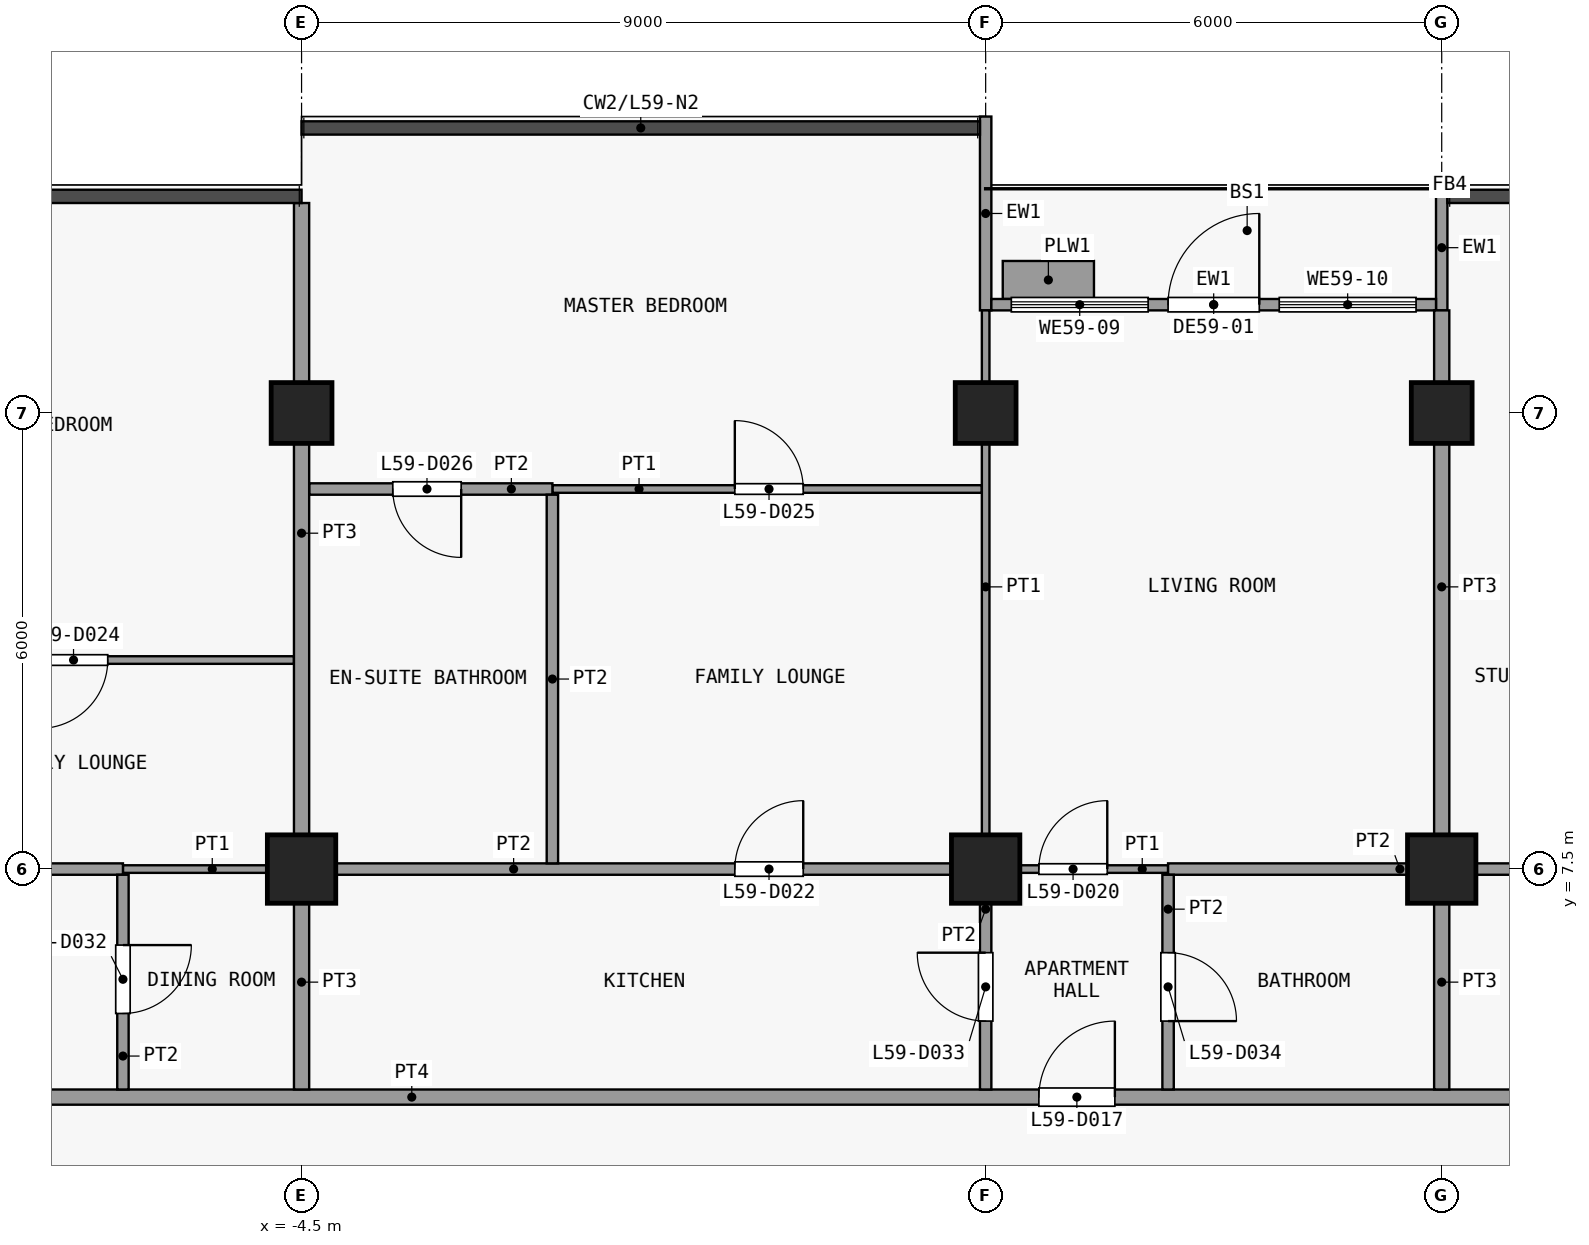
"""IFC4 building model, lengths in metres.
Left out: names, types, materials, properties, quantities, classifications, styles, units other than length and angle.
Written with IfcOpenShell. Run it as: python <this file> out.ifc"""

import sys

from ifc_helpers import new_model, si_unit, direction, frame, frame_2d, origin, origin_2d, place, context, subcontext, project, spatial, rectangle, extrude, element, fill, save


model = new_model("IFC4")
c1 = context("Model", 3, precision=1e-05, world=origin(), true_north=direction((0.0, 1.0)))
c2 = subcontext(c1, "Body", "Model", "MODEL_VIEW")
j1 = project(units=[si_unit("LENGTHUNIT", "METRE"), si_unit("PLANEANGLEUNIT", "RADIAN")], contexts=[c1])
p1 = place(None, origin())
s1 = spatial("IfcSite", under=j1, at=p1, CompositionType="ELEMENT")
p2 = place(p1, origin())
s2 = spatial("IfcBuilding", under=s1, at=p2, CompositionType="ELEMENT")
p3 = place(p2, frame((0.0, 0.0, 233.9)))
s3 = spatial("IfcBuildingStorey", under=s2, at=p3, CompositionType="ELEMENT", Elevation=233.9)
p4 = place(p3, frame((-4.5, 7.5, 0.0), z_axis=(0.0, 0.0, 1.0), x_axis=(1.0, 0.0, 0.0)))
e1 = element("IfcColumn", 1, at=p4, inside=s3, PredefinedType="COLUMN", context=c2, shape_type="SweptSolid", body=[
    extrude(rectangle(XDim=0.9, YDim=0.9, at=origin_2d()), origin(), (0.0, 0.0, 1.0), 3.6),
])
p5 = place(p3, frame((-4.5, 13.5, 0.0), z_axis=(0.0, 0.0, 1.0), x_axis=(1.0, 0.0, 0.0)))
e2 = element("IfcColumn", 2, at=p5, inside=s3, PredefinedType="COLUMN", context=c2, shape_type="SweptSolid", body=[
    extrude(rectangle(XDim=0.8, YDim=0.8, at=origin_2d()), origin(), (0.0, 0.0, 1.0), 3.6),
])
p6 = place(p3, frame((4.5, 7.5, 0.0), z_axis=(0.0, 0.0, 1.0), x_axis=(1.0, 0.0, 0.0)))
e3 = element("IfcColumn", 3, at=p6, inside=s3, PredefinedType="COLUMN", context=c2, shape_type="SweptSolid", body=[
    extrude(rectangle(XDim=0.9, YDim=0.9, at=origin_2d()), origin(), (0.0, 0.0, 1.0), 3.6),
])
p7 = place(p3, frame((4.5, 13.5, 0.0), z_axis=(0.0, 0.0, 1.0), x_axis=(1.0, 0.0, 0.0)))
e4 = element("IfcColumn", 4, at=p7, inside=s3, PredefinedType="COLUMN", context=c2, shape_type="SweptSolid", body=[
    extrude(rectangle(XDim=0.8, YDim=0.8, at=origin_2d()), origin(), (0.0, 0.0, 1.0), 3.6),
])
p8 = place(p3, frame((10.5, 7.5, 0.0), z_axis=(0.0, 0.0, 1.0), x_axis=(1.0, 0.0, 0.0)))
e5 = element("IfcColumn", 5, at=p8, inside=s3, PredefinedType="COLUMN", context=c2, shape_type="SweptSolid", body=[
    extrude(rectangle(XDim=0.9, YDim=0.9, at=origin_2d()), origin(), (0.0, 0.0, 1.0), 3.6),
])
p9 = place(p3, frame((10.5, 13.5, 0.0), z_axis=(0.0, 0.0, 1.0), x_axis=(1.0, 0.0, 0.0)))
e6 = element("IfcColumn", 6, at=p9, inside=s3, PredefinedType="COLUMN", context=c2, shape_type="SweptSolid", body=[
    extrude(rectangle(XDim=0.8, YDim=0.8, at=origin_2d()), origin(), (0.0, 0.0, 1.0), 3.6),
])
p10 = place(p3, frame((4.5, 14.85, 0.0), z_axis=(0.0, 0.0, 1.0), x_axis=(0.0, 1.0, 0.0)))
e7 = element("IfcWall", 7, at=p10, inside=s3, PredefinedType="SOLIDWALL", context=c2, shape_type="SweptSolid", body=[
    extrude(rectangle(XDim=2.55, YDim=0.15, at=frame_2d((1.275, 0.0))), origin(), (0.0, 0.0, 1.0), 3.3),
])
p11 = place(p3, frame((10.5, 14.85, 0.0), z_axis=(0.0, 0.0, 1.0), x_axis=(0.0, 1.0, 0.0)))
e8 = element("IfcWall", 8, at=p11, inside=s3, PredefinedType="SOLIDWALL", context=c2, shape_type="SweptSolid", body=[
    extrude(rectangle(XDim=1.65, YDim=0.15, at=frame_2d((0.825, 0.0))), origin(), (0.0, 0.0, 1.0), 3.3),
])
p12 = place(p3, frame((4.575, 14.925, 0.0), z_axis=(0.0, 0.0, 1.0), x_axis=(1.0, 0.0, 0.0)))
e9 = element("IfcWall", 9, at=p12, inside=s3, PredefinedType="SOLIDWALL", context=c2, shape_type="SweptSolid", body=[
    extrude(rectangle(XDim=5.85, YDim=0.15, at=frame_2d((2.925, 0.0))), origin(), (0.0, 0.0, 1.0), 3.3),
])
p13 = place(p12, frame((2.325, 0.0, 0.0)))
e10 = element("IfcOpeningElement", 10, at=p13, cuts=e9, PredefinedType="OPENING", context=c2, shape_type="SweptSolid", body=[
    extrude(rectangle(XDim=1.2, YDim=2.4, at=frame_2d((0.6, 1.2))), frame((0.0, 0.085, 0.0), z_axis=(0.0, -1.0, 0.0), x_axis=(1.0, 0.0, 0.0)), (0.0, 0.0, 1.0), 0.17),
])
p14 = place(p12, frame((0.262, 0.0, 0.9)))
e11 = element("IfcOpeningElement", 11, at=p14, cuts=e9, PredefinedType="OPENING", context=c2, shape_type="SweptSolid", body=[
    extrude(rectangle(XDim=1.8, YDim=2.1, at=frame_2d((0.9, 1.05))), frame((0.0, 0.085, 0.0), z_axis=(0.0, -1.0, 0.0), x_axis=(1.0, 0.0, 0.0)), (0.0, 0.0, 1.0), 0.17),
])
p15 = place(p12, frame((3.788, 0.0, 0.9)))
e12 = element("IfcOpeningElement", 12, at=p15, cuts=e9, PredefinedType="OPENING", context=c2, shape_type="SweptSolid", body=[
    extrude(rectangle(XDim=1.8, YDim=2.1, at=frame_2d((0.9, 1.05))), frame((0.0, 0.085, 0.0), z_axis=(0.0, -1.0, 0.0), x_axis=(1.0, 0.0, 0.0)), (0.0, 0.0, 1.0), 0.17),
])
p16 = place(p3, frame((4.725, 15.25, 0.0), z_axis=(0.0, 0.0, 1.0), x_axis=(1.0, 0.0, 0.0)))
e13 = element("IfcWall", 13, at=p16, inside=s3, PredefinedType="USERDEFINED", context=c2, shape_type="SweptSolid", body=[
    extrude(rectangle(XDim=1.2, YDim=0.5, at=frame_2d((0.6, 0.0))), origin(), (0.0, 0.0, 1.0), 0.9),
])
p17 = place(p3, frame((-20.25, 4.5, 0.0), z_axis=(0.0, 0.0, 1.0), x_axis=(1.0, 0.0, 0.0)))
e14 = element("IfcWall", 14, at=p17, inside=s3, PredefinedType="PARTITIONING", context=c2, shape_type="SweptSolid", body=[
    extrude(rectangle(XDim=39.6, YDim=0.2, at=frame_2d((19.8, 0.0))), origin(), (0.0, 0.0, 1.0), 3.3),
])
p18 = place(p17, frame((7.95, 0.0, 0.0)))
e15 = element("IfcOpeningElement", 15, at=p18, cuts=e14, PredefinedType="OPENING", context=c2, shape_type="SweptSolid", body=[
    extrude(rectangle(XDim=1.0, YDim=2.1, at=frame_2d((0.5, 1.05))), frame((0.0, 0.11, 0.0), z_axis=(0.0, -1.0, 0.0), x_axis=(1.0, 0.0, 0.0)), (0.0, 0.0, 1.0), 0.22),
])
p19 = place(p17, frame((25.45, 0.0, 0.0)))
e16 = element("IfcOpeningElement", 16, at=p19, cuts=e14, PredefinedType="OPENING", context=c2, shape_type="SweptSolid", body=[
    extrude(rectangle(XDim=1.0, YDim=2.1, at=frame_2d((0.5, 1.05))), frame((0.0, 0.11, 0.0), z_axis=(0.0, -1.0, 0.0), x_axis=(1.0, 0.0, 0.0)), (0.0, 0.0, 1.0), 0.22),
])
p20 = place(p17, frame((33.95, 0.0, 0.0)))
e17 = element("IfcOpeningElement", 17, at=p20, cuts=e14, PredefinedType="OPENING", context=c2, shape_type="SweptSolid", body=[
    extrude(rectangle(XDim=1.0, YDim=2.1, at=frame_2d((0.5, 1.05))), frame((0.0, 0.11, 0.0), z_axis=(0.0, -1.0, 0.0), x_axis=(1.0, 0.0, 0.0)), (0.0, 0.0, 1.0), 0.22),
])
p21 = place(p3, frame((-6.85, 7.5, 0.0), z_axis=(0.0, 0.0, 1.0), x_axis=(1.0, 0.0, 0.0)))
e18 = element("IfcWall", 18, at=p21, inside=s3, PredefinedType="PARTITIONING", context=c2, shape_type="SweptSolid", body=[
    extrude(rectangle(XDim=2.35, YDim=0.1, at=frame_2d((1.175, 0.0))), origin(), (0.0, 0.0, 1.0), 3.3),
])
p22 = place(p3, frame((4.5, 7.5, 0.0), z_axis=(0.0, 0.0, 1.0), x_axis=(1.0, 0.0, 0.0)))
e19 = element("IfcWall", 19, at=p22, inside=s3, PredefinedType="PARTITIONING", context=c2, shape_type="SweptSolid", body=[
    extrude(rectangle(XDim=2.4, YDim=0.1, at=frame_2d((1.2, 0.0))), origin(), (0.0, 0.0, 1.0), 3.3),
])
p23 = place(p22, frame((0.7, 0.0, 0.0)))
e20 = element("IfcOpeningElement", 20, at=p23, cuts=e19, PredefinedType="OPENING", context=c2, shape_type="SweptSolid", body=[
    extrude(rectangle(XDim=0.9, YDim=2.1, at=frame_2d((0.45, 1.05))), frame((0.0, 0.06, 0.0), z_axis=(0.0, -1.0, 0.0), x_axis=(1.0, 0.0, 0.0)), (0.0, 0.0, 1.0), 0.12),
])
p24 = place(p3, frame((-10.5, 7.5, 0.0), z_axis=(0.0, 0.0, 1.0), x_axis=(1.0, 0.0, 0.0)))
e21 = element("IfcWall", 21, at=p24, inside=s3, PredefinedType="PARTITIONING", context=c2, shape_type="SweptSolid", body=[
    extrude(rectangle(XDim=3.65, YDim=0.15, at=frame_2d((1.825, 0.0))), origin(), (0.0, 0.0, 1.0), 3.3),
])
p25 = place(p3, frame((-4.5, 7.5, 0.0), z_axis=(0.0, 0.0, 1.0), x_axis=(1.0, 0.0, 0.0)))
e22 = element("IfcWall", 22, at=p25, inside=s3, PredefinedType="PARTITIONING", context=c2, shape_type="SweptSolid", body=[
    extrude(rectangle(XDim=9.0, YDim=0.15, at=frame_2d((4.5, 0.0))), origin(), (0.0, 0.0, 1.0), 3.3),
])
p26 = place(p25, frame((5.7, 0.0, 0.0)))
e23 = element("IfcOpeningElement", 23, at=p26, cuts=e22, PredefinedType="OPENING", context=c2, shape_type="SweptSolid", body=[
    extrude(rectangle(XDim=0.9, YDim=2.1, at=frame_2d((0.45, 1.05))), frame((0.0, 0.085, 0.0), z_axis=(0.0, -1.0, 0.0), x_axis=(1.0, 0.0, 0.0)), (0.0, 0.0, 1.0), 0.17),
])
p27 = place(p3, frame((6.9, 7.5, 0.0), z_axis=(0.0, 0.0, 1.0), x_axis=(1.0, 0.0, 0.0)))
e24 = element("IfcWall", 24, at=p27, inside=s3, PredefinedType="PARTITIONING", context=c2, shape_type="SweptSolid", body=[
    extrude(rectangle(XDim=6.1, YDim=0.15, at=frame_2d((3.05, 0.0))), origin(), (0.0, 0.0, 1.0), 3.3),
])
p28 = place(p3, frame((-10.45, 10.25, 0.0), z_axis=(0.0, 0.0, 1.0), x_axis=(1.0, 0.0, 0.0)))
e25 = element("IfcWall", 25, at=p28, inside=s3, PredefinedType="PARTITIONING", context=c2, shape_type="SweptSolid", body=[
    extrude(rectangle(XDim=5.85, YDim=0.1, at=frame_2d((2.925, 0.0))), origin(), (0.0, 0.0, 1.0), 3.3),
])
p29 = place(p28, frame((2.5, 0.0, 0.0)))
e26 = element("IfcOpeningElement", 26, at=p29, cuts=e25, PredefinedType="OPENING", context=c2, shape_type="SweptSolid", body=[
    extrude(rectangle(XDim=0.9, YDim=2.1, at=frame_2d((0.45, 1.05))), frame((0.0, 0.06, 0.0), z_axis=(0.0, -1.0, 0.0), x_axis=(1.0, 0.0, 0.0)), (0.0, 0.0, 1.0), 0.12),
])
p30 = place(p3, frame((-1.2, 12.5, 0.0), z_axis=(0.0, 0.0, 1.0), x_axis=(1.0, 0.0, 0.0)))
e27 = element("IfcWall", 27, at=p30, inside=s3, PredefinedType="PARTITIONING", context=c2, shape_type="SweptSolid", body=[
    extrude(rectangle(XDim=5.65, YDim=0.1, at=frame_2d((2.825, 0.0))), origin(), (0.0, 0.0, 1.0), 3.3),
])
p31 = place(p30, frame((2.4, 0.0, 0.0)))
e28 = element("IfcOpeningElement", 28, at=p31, cuts=e27, PredefinedType="OPENING", context=c2, shape_type="SweptSolid", body=[
    extrude(rectangle(XDim=0.9, YDim=2.1, at=frame_2d((0.45, 1.05))), frame((0.0, 0.06, 0.0), z_axis=(0.0, -1.0, 0.0), x_axis=(1.0, 0.0, 0.0)), (0.0, 0.0, 1.0), 0.12),
])
p32 = place(p3, frame((-4.4, 12.5, 0.0), z_axis=(0.0, 0.0, 1.0), x_axis=(1.0, 0.0, 0.0)))
e29 = element("IfcWall", 29, at=p32, inside=s3, PredefinedType="PARTITIONING", context=c2, shape_type="SweptSolid", body=[
    extrude(rectangle(XDim=3.2, YDim=0.15, at=frame_2d((1.6, 0.0))), origin(), (0.0, 0.0, 1.0), 3.3),
])
p33 = place(p32, frame((1.1, 0.0, 0.0)))
e30 = element("IfcOpeningElement", 30, at=p33, cuts=e29, PredefinedType="OPENING", context=c2, shape_type="SweptSolid", body=[
    extrude(rectangle(XDim=0.9, YDim=2.1, at=frame_2d((0.45, 1.05))), frame((0.0, 0.085, 0.0), z_axis=(0.0, -1.0, 0.0), x_axis=(1.0, 0.0, 0.0)), (0.0, 0.0, 1.0), 0.17),
])
p34 = place(p3, frame((-6.85, 4.6, 0.0), z_axis=(0.0, 0.0, 1.0), x_axis=(0.0, 1.0, 0.0)))
e31 = element("IfcWall", 31, at=p34, inside=s3, PredefinedType="PARTITIONING", context=c2, shape_type="SweptSolid", body=[
    extrude(rectangle(XDim=2.825, YDim=0.15, at=frame_2d((1.413, 0.0))), origin(), (0.0, 0.0, 1.0), 3.3),
])
p35 = place(p34, frame((1.0, 0.0, 0.0)))
e32 = element("IfcOpeningElement", 32, at=p35, cuts=e31, PredefinedType="OPENING", context=c2, shape_type="SweptSolid", body=[
    extrude(rectangle(XDim=0.9, YDim=2.1, at=frame_2d((0.45, 1.05))), frame((0.0, 0.085, 0.0), z_axis=(0.0, -1.0, 0.0), x_axis=(1.0, 0.0, 0.0)), (0.0, 0.0, 1.0), 0.17),
])
p36 = place(p3, frame((-4.5, 4.6, 0.0), z_axis=(0.0, 0.0, 1.0), x_axis=(0.0, 1.0, 0.0)))
e33 = element("IfcWall", 33, at=p36, inside=s3, PredefinedType="PARTITIONING", context=c2, shape_type="SweptSolid", body=[
    extrude(rectangle(XDim=2.825, YDim=0.2, at=frame_2d((1.413, 0.0))), origin(), (0.0, 0.0, 1.0), 3.3),
])
p37 = place(p3, frame((-4.5, 7.575, 0.0), z_axis=(0.0, 0.0, 1.0), x_axis=(0.0, 1.0, 0.0)))
e34 = element("IfcWall", 34, at=p37, inside=s3, PredefinedType="PARTITIONING", context=c2, shape_type="SweptSolid", body=[
    extrude(rectangle(XDim=8.688, YDim=0.2, at=frame_2d((4.344, 0.0))), origin(), (0.0, 0.0, 1.0), 3.3),
])
p38 = place(p3, frame((-1.2, 7.575, 0.0), z_axis=(0.0, 0.0, 1.0), x_axis=(0.0, 1.0, 0.0)))
e35 = element("IfcWall", 35, at=p38, inside=s3, PredefinedType="PARTITIONING", context=c2, shape_type="SweptSolid", body=[
    extrude(rectangle(XDim=4.85, YDim=0.15, at=frame_2d((2.425, 0.0))), origin(), (0.0, 0.0, 1.0), 3.3),
])
p39 = place(p3, frame((4.5, 7.575, 0.0), z_axis=(0.0, 0.0, 1.0), x_axis=(0.0, 1.0, 0.0)))
e36 = element("IfcWall", 36, at=p39, inside=s3, PredefinedType="PARTITIONING", context=c2, shape_type="SweptSolid", body=[
    extrude(rectangle(XDim=7.275, YDim=0.1, at=frame_2d((3.638, 0.0))), origin(), (0.0, 0.0, 1.0), 3.3),
])
p40 = place(p3, frame((4.5, 4.6, 0.0), z_axis=(0.0, 0.0, 1.0), x_axis=(0.0, 1.0, 0.0)))
e37 = element("IfcWall", 37, at=p40, inside=s3, PredefinedType="PARTITIONING", context=c2, shape_type="SweptSolid", body=[
    extrude(rectangle(XDim=2.825, YDim=0.15, at=frame_2d((1.413, 0.0))), origin(), (0.0, 0.0, 1.0), 3.3),
])
p41 = place(p40, frame((0.9, 0.0, 0.0)))
e38 = element("IfcOpeningElement", 38, at=p41, cuts=e37, PredefinedType="OPENING", context=c2, shape_type="SweptSolid", body=[
    extrude(rectangle(XDim=0.9, YDim=2.1, at=frame_2d((0.45, 1.05))), frame((0.0, 0.085, 0.0), z_axis=(0.0, -1.0, 0.0), x_axis=(1.0, 0.0, 0.0)), (0.0, 0.0, 1.0), 0.17),
])
p42 = place(p3, frame((6.9, 4.6, 0.0), z_axis=(0.0, 0.0, 1.0), x_axis=(0.0, 1.0, 0.0)))
e39 = element("IfcWall", 39, at=p42, inside=s3, PredefinedType="PARTITIONING", context=c2, shape_type="SweptSolid", body=[
    extrude(rectangle(XDim=2.825, YDim=0.15, at=frame_2d((1.413, 0.0))), origin(), (0.0, 0.0, 1.0), 3.3),
])
p43 = place(p42, frame((0.9, 0.0, 0.0)))
e40 = element("IfcOpeningElement", 40, at=p43, cuts=e39, PredefinedType="OPENING", context=c2, shape_type="SweptSolid", body=[
    extrude(rectangle(XDim=0.9, YDim=2.1, at=frame_2d((0.45, 1.05))), frame((0.0, 0.085, 0.0), z_axis=(0.0, -1.0, 0.0), x_axis=(1.0, 0.0, 0.0)), (0.0, 0.0, 1.0), 0.17),
])
p44 = place(p3, frame((10.5, 4.6, 0.0), z_axis=(0.0, 0.0, 1.0), x_axis=(0.0, 1.0, 0.0)))
e41 = element("IfcWall", 41, at=p44, inside=s3, PredefinedType="PARTITIONING", context=c2, shape_type="SweptSolid", body=[
    extrude(rectangle(XDim=2.825, YDim=0.2, at=frame_2d((1.413, 0.0))), origin(), (0.0, 0.0, 1.0), 3.3),
])
p45 = place(p3, frame((10.5, 7.575, 0.0), z_axis=(0.0, 0.0, 1.0), x_axis=(0.0, 1.0, 0.0)))
e42 = element("IfcWall", 42, at=p45, inside=s3, PredefinedType="PARTITIONING", context=c2, shape_type="SweptSolid", body=[
    extrude(rectangle(XDim=7.275, YDim=0.2, at=frame_2d((3.638, 0.0))), origin(), (0.0, 0.0, 1.0), 3.3),
])
p46 = place(p13, origin())
e43 = element("IfcDoor", 43, at=p46, inside=s3, OperationType="SINGLE_SWING_RIGHT", PredefinedType="DOOR", context=c2, shape_type="SweptSolid", body=[
    extrude(rectangle(XDim=1.2, YDim=2.4, at=frame_2d((0.6, 1.2))), frame((0.0, 0.025, 0.0), z_axis=(0.0, -1.0, 0.0), x_axis=(1.0, 0.0, 0.0)), (0.0, 0.0, 1.0), 0.05),
])
fill(e10, e43)
p47 = place(p14, origin())
e44 = element("IfcWindow", 44, at=p47, inside=s3, PartitioningType="SINGLE_PANEL", PredefinedType="WINDOW", context=c2, shape_type="SweptSolid", body=[
    extrude(rectangle(XDim=1.8, YDim=2.1, at=frame_2d((0.9, 1.05))), frame((0.0, 0.03, 0.0), z_axis=(0.0, -1.0, 0.0), x_axis=(1.0, 0.0, 0.0)), (0.0, 0.0, 1.0), 0.06),
])
fill(e11, e44)
p48 = place(p15, origin())
e45 = element("IfcWindow", 45, at=p48, inside=s3, PartitioningType="SINGLE_PANEL", PredefinedType="WINDOW", context=c2, shape_type="SweptSolid", body=[
    extrude(rectangle(XDim=1.8, YDim=2.1, at=frame_2d((0.9, 1.05))), frame((0.0, 0.03, 0.0), z_axis=(0.0, -1.0, 0.0), x_axis=(1.0, 0.0, 0.0)), (0.0, 0.0, 1.0), 0.06),
])
fill(e12, e45)
p49 = place(p19, origin())
e46 = element("IfcDoor", 46, at=p49, inside=s3, OperationType="SINGLE_SWING_LEFT", PredefinedType="DOOR", context=c2, shape_type="SweptSolid", body=[
    extrude(rectangle(XDim=1.0, YDim=2.1, at=frame_2d((0.5, 1.05))), frame((0.0, 0.025, 0.0), z_axis=(0.0, -1.0, 0.0), x_axis=(1.0, 0.0, 0.0)), (0.0, 0.0, 1.0), 0.05),
])
fill(e16, e46)
p50 = place(p23, origin())
e47 = element("IfcDoor", 47, at=p50, inside=s3, OperationType="SINGLE_SWING_LEFT", PredefinedType="DOOR", context=c2, shape_type="SweptSolid", body=[
    extrude(rectangle(XDim=0.9, YDim=2.1, at=frame_2d((0.45, 1.05))), frame((0.0, 0.025, 0.0), z_axis=(0.0, -1.0, 0.0), x_axis=(1.0, 0.0, 0.0)), (0.0, 0.0, 1.0), 0.05),
])
fill(e20, e47)
p51 = place(p26, origin())
e48 = element("IfcDoor", 48, at=p51, inside=s3, OperationType="SINGLE_SWING_LEFT", PredefinedType="DOOR", context=c2, shape_type="SweptSolid", body=[
    extrude(rectangle(XDim=0.9, YDim=2.1, at=frame_2d((0.45, 1.05))), frame((0.0, 0.025, 0.0), z_axis=(0.0, -1.0, 0.0), x_axis=(1.0, 0.0, 0.0)), (0.0, 0.0, 1.0), 0.05),
])
fill(e23, e48)
p52 = place(p29, origin())
e49 = element("IfcDoor", 49, at=p52, inside=s3, OperationType="SINGLE_SWING_LEFT", PredefinedType="DOOR", context=c2, shape_type="SweptSolid", body=[
    extrude(rectangle(XDim=0.9, YDim=2.1, at=frame_2d((0.45, 1.05))), frame((0.0, 0.025, 0.0), z_axis=(0.0, -1.0, 0.0), x_axis=(1.0, 0.0, 0.0)), (0.0, 0.0, 1.0), 0.05),
])
fill(e26, e49)
p53 = place(p31, origin())
e50 = element("IfcDoor", 50, at=p53, inside=s3, OperationType="SINGLE_SWING_RIGHT", PredefinedType="DOOR", context=c2, shape_type="SweptSolid", body=[
    extrude(rectangle(XDim=0.9, YDim=2.1, at=frame_2d((0.45, 1.05))), frame((0.0, 0.025, 0.0), z_axis=(0.0, -1.0, 0.0), x_axis=(1.0, 0.0, 0.0)), (0.0, 0.0, 1.0), 0.05),
])
fill(e28, e50)
p54 = place(p33, origin())
e51 = element("IfcDoor", 51, at=p54, inside=s3, OperationType="SINGLE_SWING_RIGHT", PredefinedType="DOOR", context=c2, shape_type="SweptSolid", body=[
    extrude(rectangle(XDim=0.9, YDim=2.1, at=frame_2d((0.45, 1.05))), frame((0.0, 0.025, 0.0), z_axis=(0.0, -1.0, 0.0), x_axis=(1.0, 0.0, 0.0)), (0.0, 0.0, 1.0), 0.05),
])
fill(e30, e51)
p55 = place(p35, origin())
e52 = element("IfcDoor", 52, at=p55, inside=s3, OperationType="SINGLE_SWING_RIGHT", PredefinedType="DOOR", context=c2, shape_type="SweptSolid", body=[
    extrude(rectangle(XDim=0.9, YDim=2.1, at=frame_2d((0.45, 1.05))), frame((0.0, 0.025, 0.0), z_axis=(0.0, -1.0, 0.0), x_axis=(1.0, 0.0, 0.0)), (0.0, 0.0, 1.0), 0.05),
])
fill(e32, e52)
p56 = place(p41, origin())
e53 = element("IfcDoor", 53, at=p56, inside=s3, OperationType="SINGLE_SWING_LEFT", PredefinedType="DOOR", context=c2, shape_type="SweptSolid", body=[
    extrude(rectangle(XDim=0.9, YDim=2.1, at=frame_2d((0.45, 1.05))), frame((0.0, 0.025, 0.0), z_axis=(0.0, -1.0, 0.0), x_axis=(1.0, 0.0, 0.0)), (0.0, 0.0, 1.0), 0.05),
])
fill(e38, e53)
p57 = place(p43, origin())
e54 = element("IfcDoor", 54, at=p57, inside=s3, OperationType="SINGLE_SWING_LEFT", PredefinedType="DOOR", context=c2, shape_type="SweptSolid", body=[
    extrude(rectangle(XDim=0.9, YDim=2.1, at=frame_2d((0.45, 1.05))), frame((0.0, 0.025, 0.0), z_axis=(0.0, -1.0, 0.0), x_axis=(1.0, 0.0, 0.0)), (0.0, 0.0, 1.0), 0.05),
])
fill(e40, e54)
save(model, sys.argv[1])
